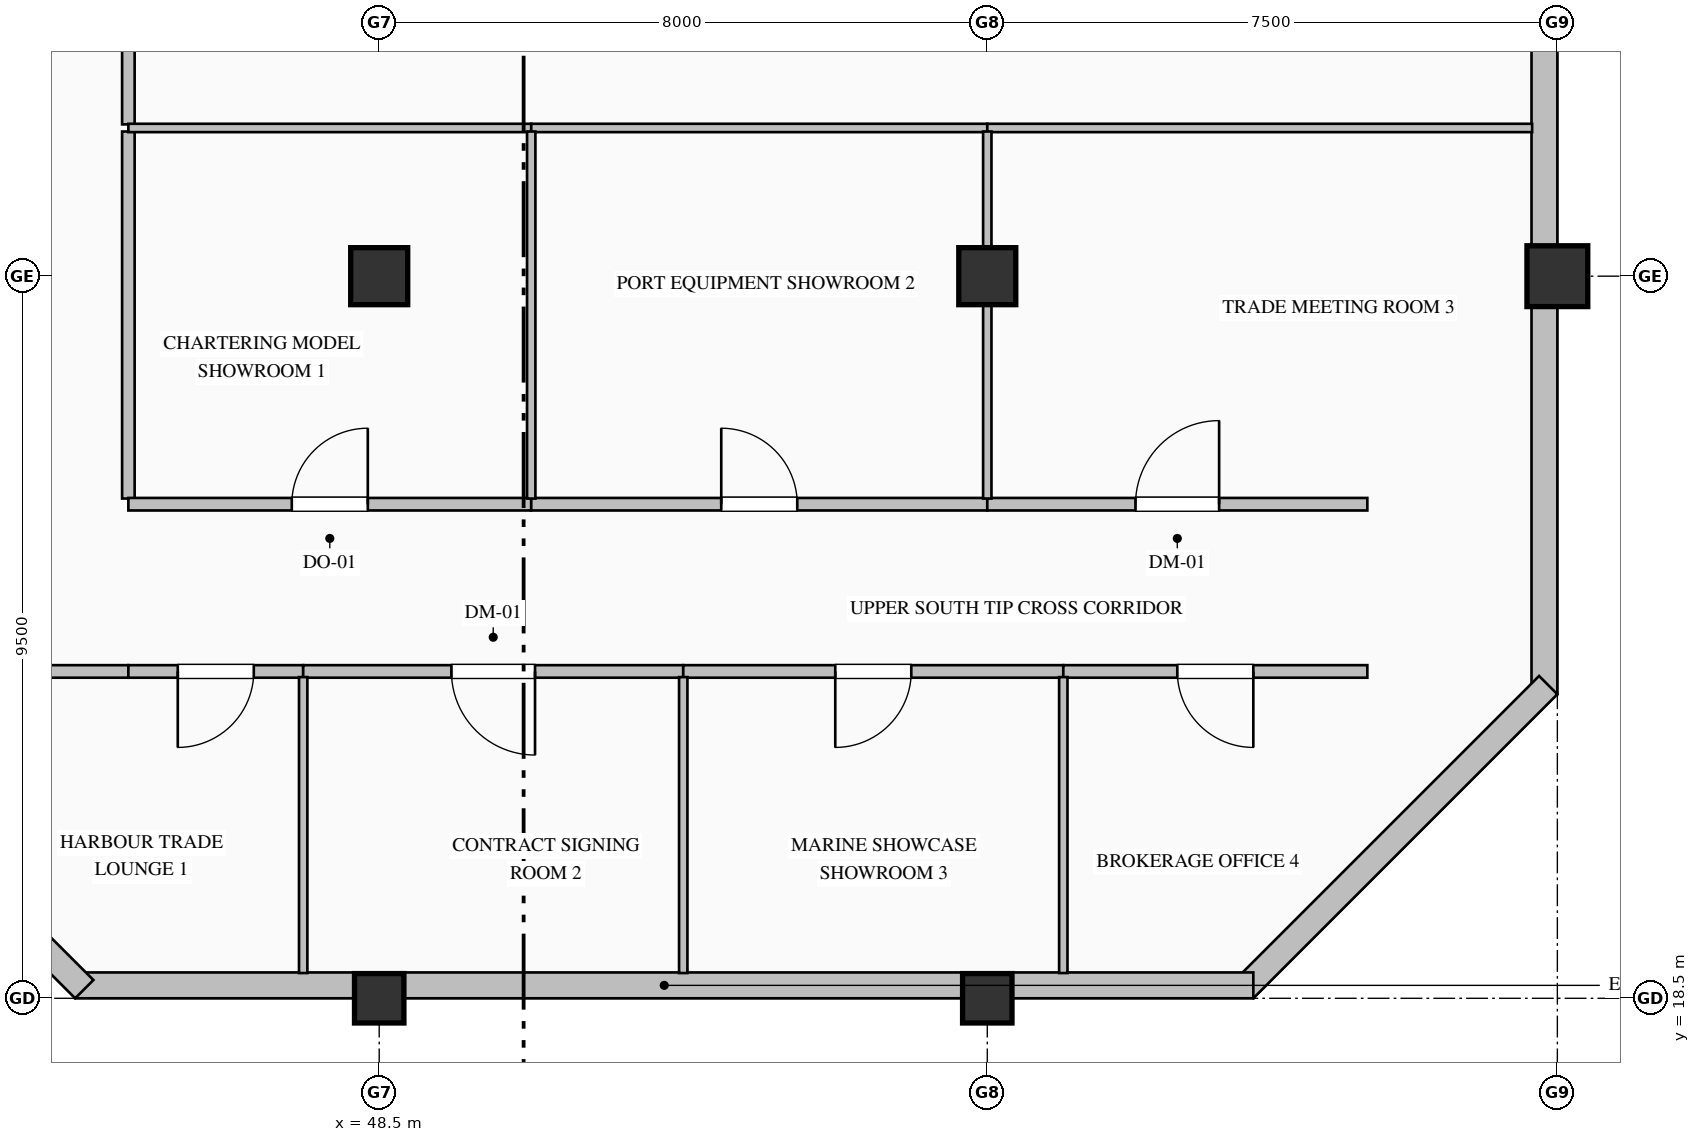
"""IFC4 building model, lengths in metres.
Left out: names, types, materials, properties, quantities, classifications, styles, units other than length and angle.
Written with IfcOpenShell. Run it as: python <this file> out.ifc"""

import sys

from ifc_helpers import new_model, si_unit, direction, frame, frame_2d, origin, origin_2d, place, context, subcontext, project, spatial, rectangle, hollow_rectangle, extrude, element, fill, save


model = new_model("IFC4")
c1 = context("Model", 3, precision=1e-05, world=origin(), true_north=direction((0.0, 1.0)))
c2 = subcontext(c1, "Body", "Model", "MODEL_VIEW")
j1 = project(units=[si_unit("LENGTHUNIT", "METRE"), si_unit("PLANEANGLEUNIT", "RADIAN")], contexts=[c1])
p1 = place(None, origin())
s1 = spatial("IfcSite", under=j1, at=p1, CompositionType="ELEMENT")
p2 = place(p1, origin())
s2 = spatial("IfcBuilding", under=s1, at=p2, CompositionType="ELEMENT")
p3 = place(p2, frame((0.0, 0.0, 359.2)))
s3 = spatial("IfcBuildingStorey", under=s2, at=p3, CompositionType="ELEMENT", Elevation=359.2)
p4 = place(p3, frame((48.5, 18.5, 0.0), z_axis=(0.0, 0.0, 1.0), x_axis=(1.0, 0.0, 0.0)))
e1 = element("IfcColumn", 1, at=p4, inside=s3, PredefinedType="COLUMN", context=c2, shape_type="SweptSolid", body=[
    extrude(hollow_rectangle(XDim=0.65, YDim=0.65, WallThickness=0.028, at=origin_2d()), origin(), (0.0, 0.0, 1.0), 4.0),
])
p5 = place(p3, frame((48.5, 28.0, 0.0), z_axis=(0.0, 0.0, 1.0), x_axis=(1.0, 0.0, 0.0)))
e2 = element("IfcColumn", 2, at=p5, inside=s3, PredefinedType="COLUMN", context=c2, shape_type="SweptSolid", body=[
    extrude(rectangle(XDim=0.75, YDim=0.75, at=origin_2d()), origin(), (0.0, 0.0, 1.0), 4.0),
])
p6 = place(p3, frame((56.5, 18.5, 0.0), z_axis=(0.0, 0.0, 1.0), x_axis=(1.0, 0.0, 0.0)))
e3 = element("IfcColumn", 3, at=p6, inside=s3, PredefinedType="COLUMN", context=c2, shape_type="SweptSolid", body=[
    extrude(hollow_rectangle(XDim=0.65, YDim=0.65, WallThickness=0.028, at=origin_2d()), origin(), (0.0, 0.0, 1.0), 4.0),
])
p7 = place(p3, frame((56.5, 28.0, 0.0), z_axis=(0.0, 0.0, 1.0), x_axis=(1.0, 0.0, 0.0)))
e4 = element("IfcColumn", 4, at=p7, inside=s3, PredefinedType="COLUMN", context=c2, shape_type="SweptSolid", body=[
    extrude(rectangle(XDim=0.75, YDim=0.75, at=origin_2d()), origin(), (0.0, 0.0, 1.0), 4.0),
])
p8 = place(p3, frame((64.0, 28.0, 0.0), z_axis=(0.0, 0.0, 1.0), x_axis=(1.0, 0.0, 0.0)))
e5 = element("IfcColumn", 5, at=p8, inside=s3, PredefinedType="COLUMN", context=c2, shape_type="SweptSolid", body=[
    extrude(hollow_rectangle(XDim=0.8, YDim=0.8, WallThickness=0.032, at=origin_2d()), origin(), (0.0, 0.0, 1.0), 4.0),
])
p9 = place(p3, frame((63.83, 36.05, 0.0), z_axis=(0.0, 0.0, 1.0), x_axis=(0.0, -1.0, 0.0)))
e6 = element("IfcWall", 6, at=p9, inside=s3, PredefinedType="SOLIDWALL", context=c2, shape_type="SweptSolid", body=[
    extrude(rectangle(XDim=13.55, YDim=0.34, at=frame_2d((6.775, 0.0))), origin(), (0.0, 0.0, 1.0), 3.335),
])
p10 = place(p9, frame((3.125, 0.0, 0.9)))
e7 = element("IfcOpeningElement", 7, at=p10, cuts=e6, PredefinedType="OPENING", context=c2, shape_type="SweptSolid", body=[
    extrude(rectangle(XDim=0.95, YDim=1.85, at=frame_2d((0.475, 0.925))), frame((0.0, 0.18, 0.0), z_axis=(0.0, -1.0, 0.0), x_axis=(1.0, 0.0, 0.0)), (0.0, 0.0, 1.0), 0.36),
])
p11 = place(p3, frame((63.88, 22.62, 0.0), z_axis=(0.0, 0.0, 1.0), x_axis=(-0.707106781187, -0.707106781187, 0.0)))
e8 = element("IfcWall", 8, at=p11, inside=s3, PredefinedType="SOLIDWALL", context=c2, shape_type="SweptSolid", body=[
    extrude(rectangle(XDim=5.657, YDim=0.34, at=frame_2d((2.828, 0.0))), origin(), (0.0, 0.0, 1.0), 3.785),
])
p12 = place(p3, frame((60.0, 18.67, 0.0), z_axis=(0.0, 0.0, 1.0), x_axis=(-1.0, 0.0, 0.0)))
e9 = element("IfcWall", 9, at=p12, inside=s3, PredefinedType="SOLIDWALL", context=c2, shape_type="SweptSolid", body=[
    extrude(rectangle(XDim=15.5, YDim=0.34, at=frame_2d((7.75, 0.0))), origin(), (0.0, 0.0, 1.0), 3.335),
])
p13 = place(p3, frame((44.62, 18.62, 0.0), z_axis=(0.0, 0.0, 1.0), x_axis=(-0.707106781187, 0.707106781187, 0.0)))
e10 = element("IfcWall", 10, at=p13, inside=s3, PredefinedType="SOLIDWALL", context=c2, shape_type="SweptSolid", body=[
    extrude(rectangle(XDim=5.657, YDim=0.34, at=frame_2d((2.828, 0.0))), origin(), (0.0, 0.0, 1.0), 3.785),
])
p14 = place(p3, frame((45.2, 33.525, 0.0), z_axis=(0.0, 0.0, 1.0), x_axis=(0.0, -1.0, 0.0)))
e11 = element("IfcWall", 11, at=p14, inside=s3, PredefinedType="PARTITIONING", context=c2, shape_type="SweptSolid", body=[
    extrude(rectangle(XDim=3.528, YDim=0.165, at=frame_2d((1.764, 0.0))), origin(), (0.0, 0.0, 1.0), 3.785),
])
p15 = place(p3, frame((45.2, 29.903, 0.0), z_axis=(0.0, 0.0, 1.0), x_axis=(0.0, -1.0, 0.0)))
e12 = element("IfcWall", 12, at=p15, inside=s3, PredefinedType="PARTITIONING", context=c2, shape_type="SweptSolid", body=[
    extrude(rectangle(XDim=4.829, YDim=0.165, at=frame_2d((2.414, 0.0))), origin(), (0.0, 0.0, 1.0), 3.785),
])
p16 = place(p3, frame((45.2, 22.8, 0.0), z_axis=(0.0, 0.0, 1.0), x_axis=(-1.0, 0.0, 0.0)))
e13 = element("IfcWall", 13, at=p16, inside=s3, PredefinedType="PARTITIONING", context=c2, shape_type="SweptSolid", body=[
    extrude(rectangle(XDim=2.2, YDim=0.165, at=frame_2d((1.1, 0.0))), origin(), (0.0, 0.0, 1.0), 3.785),
])
p17 = place(p3, frame((45.2, 25.0, 0.0), z_axis=(0.0, 0.0, 1.0), x_axis=(1.0, 0.0, 0.0)))
e14 = element("IfcWall", 14, at=p17, inside=s3, PredefinedType="PARTITIONING", context=c2, shape_type="SweptSolid", body=[
    extrude(rectangle(XDim=5.3, YDim=0.165, at=frame_2d((2.65, 0.0))), origin(), (0.0, 0.0, 1.0), 3.785),
])
p18 = place(p17, frame((2.15, 0.0, 0.0)))
e15 = element("IfcOpeningElement", 15, at=p18, cuts=e14, PredefinedType="OPENING", context=c2, shape_type="SweptSolid", body=[
    extrude(rectangle(XDim=1.0, YDim=2.15, at=frame_2d((0.5, 1.075))), frame((0.0, 0.093, 0.0), z_axis=(0.0, -1.0, 0.0), x_axis=(1.0, 0.0, 0.0)), (0.0, 0.0, 1.0), 0.185),
])
p19 = place(p3, frame((50.5, 25.0, 0.0), z_axis=(0.0, 0.0, 1.0), x_axis=(1.0, 0.0, 0.0)))
e16 = element("IfcWall", 16, at=p19, inside=s3, PredefinedType="PARTITIONING", context=c2, shape_type="SweptSolid", body=[
    extrude(rectangle(XDim=6.0, YDim=0.165, at=frame_2d((3.0, 0.0))), origin(), (0.0, 0.0, 1.0), 3.785),
])
p20 = place(p19, frame((2.5, 0.0, 0.0)))
e17 = element("IfcOpeningElement", 17, at=p20, cuts=e16, PredefinedType="OPENING", context=c2, shape_type="SweptSolid", body=[
    extrude(rectangle(XDim=1.0, YDim=2.15, at=frame_2d((0.5, 1.075))), frame((0.0, 0.093, 0.0), z_axis=(0.0, -1.0, 0.0), x_axis=(1.0, 0.0, 0.0)), (0.0, 0.0, 1.0), 0.185),
])
p21 = place(p3, frame((56.5, 25.0, 0.0), z_axis=(0.0, 0.0, 1.0), x_axis=(1.0, 0.0, 0.0)))
e18 = element("IfcWall", 18, at=p21, inside=s3, PredefinedType="PARTITIONING", context=c2, shape_type="SweptSolid", body=[
    extrude(rectangle(XDim=5.0, YDim=0.165, at=frame_2d((2.5, 0.0))), origin(), (0.0, 0.0, 1.0), 3.785),
])
p22 = place(p21, frame((1.95, 0.0, 0.0)))
e19 = element("IfcOpeningElement", 19, at=p22, cuts=e18, PredefinedType="OPENING", context=c2, shape_type="SweptSolid", body=[
    extrude(rectangle(XDim=1.1, YDim=2.2, at=frame_2d((0.55, 1.1))), frame((0.0, 0.093, 0.0), z_axis=(0.0, -1.0, 0.0), x_axis=(1.0, 0.0, 0.0)), (0.0, 0.0, 1.0), 0.185),
])
p23 = place(p3, frame((47.5, 22.8, 0.0), z_axis=(0.0, 0.0, 1.0), x_axis=(-1.0, 0.0, 0.0)))
e20 = element("IfcWall", 20, at=p23, inside=s3, PredefinedType="PARTITIONING", context=c2, shape_type="SweptSolid", body=[
    extrude(rectangle(XDim=2.3, YDim=0.165, at=frame_2d((1.15, 0.0))), origin(), (0.0, 0.0, 1.0), 3.785),
])
p24 = place(p23, frame((0.65, 0.0, 0.0)))
e21 = element("IfcOpeningElement", 21, at=p24, cuts=e20, PredefinedType="OPENING", context=c2, shape_type="SweptSolid", body=[
    extrude(rectangle(XDim=1.0, YDim=2.15, at=frame_2d((0.5, 1.075))), frame((0.0, 0.093, 0.0), z_axis=(0.0, -1.0, 0.0), x_axis=(1.0, 0.0, 0.0)), (0.0, 0.0, 1.0), 0.185),
])
p25 = place(p3, frame((52.5, 22.8, 0.0), z_axis=(0.0, 0.0, 1.0), x_axis=(-1.0, 0.0, 0.0)))
e22 = element("IfcWall", 22, at=p25, inside=s3, PredefinedType="PARTITIONING", context=c2, shape_type="SweptSolid", body=[
    extrude(rectangle(XDim=5.0, YDim=0.165, at=frame_2d((2.5, 0.0))), origin(), (0.0, 0.0, 1.0), 3.785),
])
p26 = place(p25, frame((1.95, 0.0, 0.0)))
e23 = element("IfcOpeningElement", 23, at=p26, cuts=e22, PredefinedType="OPENING", context=c2, shape_type="SweptSolid", body=[
    extrude(rectangle(XDim=1.1, YDim=2.2, at=frame_2d((0.55, 1.1))), frame((0.0, 0.093, 0.0), z_axis=(0.0, -1.0, 0.0), x_axis=(1.0, 0.0, 0.0)), (0.0, 0.0, 1.0), 0.185),
])
p27 = place(p3, frame((57.5, 22.8, 0.0), z_axis=(0.0, 0.0, 1.0), x_axis=(-1.0, 0.0, 0.0)))
e24 = element("IfcWall", 24, at=p27, inside=s3, PredefinedType="PARTITIONING", context=c2, shape_type="SweptSolid", body=[
    extrude(rectangle(XDim=5.0, YDim=0.165, at=frame_2d((2.5, 0.0))), origin(), (0.0, 0.0, 1.0), 3.785),
])
p28 = place(p27, frame((2.0, 0.0, 0.0)))
e25 = element("IfcOpeningElement", 25, at=p28, cuts=e24, PredefinedType="OPENING", context=c2, shape_type="SweptSolid", body=[
    extrude(rectangle(XDim=1.0, YDim=2.15, at=frame_2d((0.5, 1.075))), frame((0.0, 0.093, 0.0), z_axis=(0.0, -1.0, 0.0), x_axis=(1.0, 0.0, 0.0)), (0.0, 0.0, 1.0), 0.185),
])
p29 = place(p3, frame((61.5, 22.8, 0.0), z_axis=(0.0, 0.0, 1.0), x_axis=(-1.0, 0.0, 0.0)))
e26 = element("IfcWall", 26, at=p29, inside=s3, PredefinedType="PARTITIONING", context=c2, shape_type="SweptSolid", body=[
    extrude(rectangle(XDim=4.0, YDim=0.165, at=frame_2d((2.0, 0.0))), origin(), (0.0, 0.0, 1.0), 3.785),
])
p30 = place(p29, frame((1.5, 0.0, 0.0)))
e27 = element("IfcOpeningElement", 27, at=p30, cuts=e26, PredefinedType="OPENING", context=c2, shape_type="SweptSolid", body=[
    extrude(rectangle(XDim=1.0, YDim=2.15, at=frame_2d((0.5, 1.075))), frame((0.0, 0.093, 0.0), z_axis=(0.0, -1.0, 0.0), x_axis=(1.0, 0.0, 0.0)), (0.0, 0.0, 1.0), 0.185),
])
p31 = place(p3, frame((50.5, 29.95, 0.0), z_axis=(0.0, 0.0, 1.0), x_axis=(-1.0, 0.0, 0.0)))
e28 = element("IfcWall", 28, at=p31, inside=s3, PredefinedType="MOVABLE", context=c2, shape_type="SweptSolid", body=[
    extrude(rectangle(XDim=5.3, YDim=0.11, at=frame_2d((2.65, 0.0))), origin(), (0.0, 0.0, 1.0), 3.785),
])
p32 = place(p3, frame((56.5, 29.95, 0.0), z_axis=(0.0, 0.0, 1.0), x_axis=(-1.0, 0.0, 0.0)))
e29 = element("IfcWall", 29, at=p32, inside=s3, PredefinedType="MOVABLE", context=c2, shape_type="SweptSolid", body=[
    extrude(rectangle(XDim=6.0, YDim=0.11, at=frame_2d((3.0, 0.0))), origin(), (0.0, 0.0, 1.0), 3.785),
])
p33 = place(p3, frame((63.668, 29.95, 0.0), z_axis=(0.0, 0.0, 1.0), x_axis=(-1.0, 0.0, 0.0)))
e30 = element("IfcWall", 30, at=p33, inside=s3, PredefinedType="MOVABLE", context=c2, shape_type="SweptSolid", body=[
    extrude(rectangle(XDim=7.168, YDim=0.11, at=frame_2d((3.584, 0.0))), origin(), (0.0, 0.0, 1.0), 3.785),
])
p34 = place(p3, frame((50.5, 29.903, 0.0), z_axis=(0.0, 0.0, 1.0), x_axis=(0.0, -1.0, 0.0)))
e31 = element("IfcWall", 31, at=p34, inside=s3, PredefinedType="MOVABLE", context=c2, shape_type="SweptSolid", body=[
    extrude(rectangle(XDim=4.829, YDim=0.11, at=frame_2d((2.414, 0.0))), origin(), (0.0, 0.0, 1.0), 3.785),
])
p35 = place(p3, frame((56.5, 29.903, 0.0), z_axis=(0.0, 0.0, 1.0), x_axis=(0.0, -1.0, 0.0)))
e32 = element("IfcWall", 32, at=p35, inside=s3, PredefinedType="MOVABLE", context=c2, shape_type="SweptSolid", body=[
    extrude(rectangle(XDim=4.829, YDim=0.11, at=frame_2d((2.414, 0.0))), origin(), (0.0, 0.0, 1.0), 2.977),
])
for number, where, z_axis, x_axis in (
    (33, (47.5, 22.726, 0.0), (0.0, 0.0, 1.0), (0.0, -1.0, 0.0)),
    (34, (52.5, 22.726, 0.0), (0.0, 0.0, 1.0), (0.0, -1.0, 0.0)),
    (35, (57.5, 22.726, 0.0), (0.0, 0.0, 1.0), (0.0, -1.0, 0.0)),
):
    element("IfcWall", number, at=place(p3, frame(where, z_axis=z_axis, x_axis=x_axis)), inside=s3, PredefinedType="MOVABLE", context=c2, shape_type="SweptSolid", body=[
        extrude(rectangle(XDim=3.894, YDim=0.11, at=frame_2d((1.947, 0.0))), origin(), (0.0, 0.0, 1.0), 3.785),
    ])
p36 = place(p18, origin())
e36 = element("IfcDoor", 36, at=p36, inside=s3, OperationType="SINGLE_SWING_RIGHT", PredefinedType="DOOR", context=c2, shape_type="SweptSolid", body=[
    extrude(rectangle(XDim=1.0, YDim=2.15, at=frame_2d((0.5, 1.075))), frame((0.0, 0.025, 0.0), z_axis=(0.0, -1.0, 0.0), x_axis=(1.0, 0.0, 0.0)), (0.0, 0.0, 1.0), 0.05),
])
fill(e15, e36)
p37 = place(p20, origin())
e37 = element("IfcDoor", 37, at=p37, inside=s3, OperationType="SINGLE_SWING_LEFT", PredefinedType="DOOR", context=c2, shape_type="SweptSolid", body=[
    extrude(rectangle(XDim=1.0, YDim=2.15, at=frame_2d((0.5, 1.075))), frame((0.0, 0.025, 0.0), z_axis=(0.0, -1.0, 0.0), x_axis=(1.0, 0.0, 0.0)), (0.0, 0.0, 1.0), 0.05),
])
fill(e17, e37)
p38 = place(p22, origin())
e38 = element("IfcDoor", 38, at=p38, inside=s3, OperationType="SINGLE_SWING_RIGHT", PredefinedType="DOOR", context=c2, shape_type="SweptSolid", body=[
    extrude(rectangle(XDim=1.1, YDim=2.2, at=frame_2d((0.55, 1.1))), frame((0.0, 0.025, 0.0), z_axis=(0.0, -1.0, 0.0), x_axis=(1.0, 0.0, 0.0)), (0.0, 0.0, 1.0), 0.05),
])
fill(e19, e38)
p39 = place(p24, origin())
e39 = element("IfcDoor", 39, at=p39, inside=s3, OperationType="SINGLE_SWING_RIGHT", PredefinedType="DOOR", context=c2, shape_type="SweptSolid", body=[
    extrude(rectangle(XDim=1.0, YDim=2.15, at=frame_2d((0.5, 1.075))), frame((0.0, 0.025, 0.0), z_axis=(0.0, -1.0, 0.0), x_axis=(1.0, 0.0, 0.0)), (0.0, 0.0, 1.0), 0.05),
])
fill(e21, e39)
p40 = place(p26, origin())
e40 = element("IfcDoor", 40, at=p40, inside=s3, OperationType="SINGLE_SWING_LEFT", PredefinedType="DOOR", context=c2, shape_type="SweptSolid", body=[
    extrude(rectangle(XDim=1.1, YDim=2.2, at=frame_2d((0.55, 1.1))), frame((0.0, 0.025, 0.0), z_axis=(0.0, -1.0, 0.0), x_axis=(1.0, 0.0, 0.0)), (0.0, 0.0, 1.0), 0.05),
])
fill(e23, e40)
p41 = place(p28, origin())
e41 = element("IfcDoor", 41, at=p41, inside=s3, OperationType="SINGLE_SWING_RIGHT", PredefinedType="DOOR", context=c2, shape_type="SweptSolid", body=[
    extrude(rectangle(XDim=1.0, YDim=2.15, at=frame_2d((0.5, 1.075))), frame((0.0, 0.025, 0.0), z_axis=(0.0, -1.0, 0.0), x_axis=(1.0, 0.0, 0.0)), (0.0, 0.0, 1.0), 0.05),
])
fill(e25, e41)
p42 = place(p30, origin())
e42 = element("IfcDoor", 42, at=p42, inside=s3, OperationType="SINGLE_SWING_LEFT", PredefinedType="DOOR", context=c2, shape_type="SweptSolid", body=[
    extrude(rectangle(XDim=1.0, YDim=2.15, at=frame_2d((0.5, 1.075))), frame((0.0, 0.025, 0.0), z_axis=(0.0, -1.0, 0.0), x_axis=(1.0, 0.0, 0.0)), (0.0, 0.0, 1.0), 0.05),
])
fill(e27, e42)
save(model, sys.argv[1])
